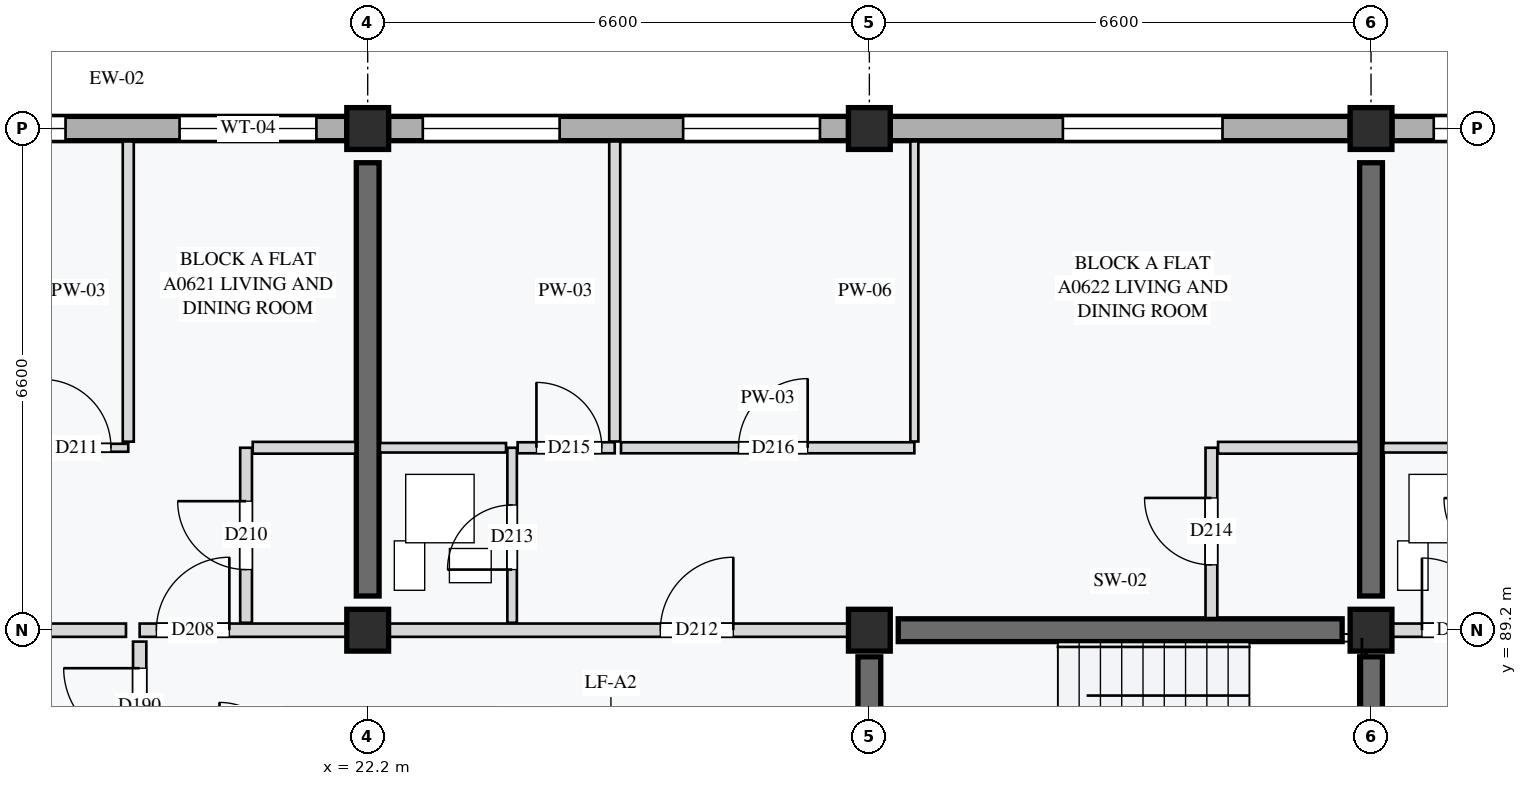
"""IFC4 building model, lengths in metres.
Left out: names, types, materials, properties, quantities, classifications, styles, units other than length and angle.
Written with IfcOpenShell. Run it as: python <this file> out.ifc"""

import sys

from ifc_helpers import new_model, si_unit, direction, frame, frame_2d, origin, origin_2d, place, context, subcontext, project, spatial, rectangle, extrude, element, fill, save


model = new_model("IFC4")
c1 = context("Model", 3, precision=1e-05, world=origin(), true_north=direction((0.0, 1.0)))
c2 = subcontext(c1, "Body", "Model", "MODEL_VIEW")
j1 = project(units=[si_unit("LENGTHUNIT", "METRE"), si_unit("PLANEANGLEUNIT", "RADIAN")], contexts=[c1])
p1 = place(None, origin())
s1 = spatial("IfcSite", under=j1, at=p1, CompositionType="ELEMENT")
p2 = place(p1, origin())
s2 = spatial("IfcBuilding", under=s1, at=p2, CompositionType="ELEMENT")
p3 = place(p2, frame((0.0, 0.0, 21.2)))
s3 = spatial("IfcBuildingStorey", under=s2, at=p3, CompositionType="ELEMENT", Elevation=21.2)
for number, where, z_axis, x_axis in (
    (1, (22.2, 89.2, 0.0), (0.0, 0.0, 1.0), (1.0, 0.0, 0.0)),
    (2, (22.2, 95.8, 0.0), (0.0, 0.0, 1.0), (1.0, 0.0, 0.0)),
    (3, (28.8, 89.2, 0.0), (0.0, 0.0, 1.0), (1.0, 0.0, 0.0)),
    (4, (28.8, 95.8, 0.0), (0.0, 0.0, 1.0), (1.0, 0.0, 0.0)),
    (5, (35.4, 89.2, 0.0), (0.0, 0.0, 1.0), (1.0, 0.0, 0.0)),
    (6, (35.4, 95.8, 0.0), (0.0, 0.0, 1.0), (1.0, 0.0, 0.0)),
):
    element("IfcColumn", number, at=place(p3, frame(where, z_axis=z_axis, x_axis=x_axis)), inside=s3, PredefinedType="COLUMN", context=c2, shape_type="SweptSolid", body=[
        extrude(rectangle(XDim=0.55, YDim=0.55, at=origin_2d()), origin(), (0.0, 0.0, 1.0), 3.2),
    ])
p4 = place(p3, frame((29.18, 89.2, 0.0), z_axis=(0.0, 0.0, 1.0), x_axis=(1.0, 0.0, 0.0)))
e7 = element("IfcWall", 7, at=p4, inside=s3, PredefinedType="SHEAR", context=c2, shape_type="SweptSolid", body=[
    extrude(rectangle(XDim=5.84, YDim=0.3, at=frame_2d((2.92, 0.0))), origin(), (0.0, 0.0, 1.0), 2.96),
])
for number, where, z_axis, x_axis in (
    (8, (28.8, 86.05, 0.0), (0.0, 0.0, 1.0), (0.0, 1.0, 0.0)),
    (9, (35.4, 86.05, 0.0), (0.0, 0.0, 1.0), (0.0, 1.0, 0.0)),
):
    element("IfcWall", number, at=place(p3, frame(where, z_axis=z_axis, x_axis=x_axis)), inside=s3, PredefinedType="SHEAR", context=c2, shape_type="SweptSolid", body=[
        extrude(rectangle(XDim=2.8, YDim=0.3, at=frame_2d((1.4, 0.0))), origin(), (0.0, 0.0, 1.0), 2.96),
    ])
for number, where, z_axis, x_axis in (
    (10, (22.2, 89.65, 0.0), (0.0, 0.0, 1.0), (0.0, 1.0, 0.0)),
    (11, (35.4, 89.65, 0.0), (0.0, 0.0, 1.0), (0.0, 1.0, 0.0)),
):
    element("IfcWall", number, at=place(p3, frame(where, z_axis=z_axis, x_axis=x_axis)), inside=s3, PredefinedType="SHEAR", context=c2, shape_type="SweptSolid", body=[
        extrude(rectangle(XDim=5.7, YDim=0.3, at=frame_2d((2.85, 0.0))), origin(), (0.0, 0.0, 1.0), 2.96),
    ])
p5 = place(p3, frame((15.875, 95.8, 0.0), z_axis=(0.0, 0.0, 1.0), x_axis=(1.0, 0.0, 0.0)))
e12 = element("IfcWall", 12, at=p5, inside=s3, PredefinedType="STANDARD", context=c2, shape_type="SweptSolid", body=[
    extrude(rectangle(XDim=6.05, YDim=0.32, at=frame_2d((3.025, 0.0))), origin(), (0.0, 0.0, 1.0), 2.6),
])
p6 = place(p5, frame((0.55, 0.0, 0.85)))
e13 = element("IfcOpeningElement", 13, at=p6, cuts=e12, PredefinedType="OPENING", context=c2, shape_type="SweptSolid", body=[
    extrude(rectangle(XDim=1.8, YDim=1.35, at=frame_2d((0.9, 0.675))), frame((0.0, 0.17, 0.0), z_axis=(0.0, -1.0, 0.0), x_axis=(1.0, 0.0, 0.0)), (0.0, 0.0, 1.0), 0.34),
])
p7 = place(p5, frame((3.85, 0.0, 0.85)))
e14 = element("IfcOpeningElement", 14, at=p7, cuts=e12, PredefinedType="OPENING", context=c2, shape_type="SweptSolid", body=[
    extrude(rectangle(XDim=1.8, YDim=1.55, at=frame_2d((0.9, 0.775))), frame((0.0, 0.17, 0.0), z_axis=(0.0, -1.0, 0.0), x_axis=(1.0, 0.0, 0.0)), (0.0, 0.0, 1.0), 0.34),
])
p8 = place(p3, frame((22.475, 95.8, 0.0), z_axis=(0.0, 0.0, 1.0), x_axis=(1.0, 0.0, 0.0)))
e15 = element("IfcWall", 15, at=p8, inside=s3, PredefinedType="STANDARD", context=c2, shape_type="SweptSolid", body=[
    extrude(rectangle(XDim=6.05, YDim=0.32, at=frame_2d((3.025, 0.0))), origin(), (0.0, 0.0, 1.0), 2.6),
])
p9 = place(p8, frame((0.45, 0.0, 0.85)))
e16 = element("IfcOpeningElement", 16, at=p9, cuts=e15, PredefinedType="OPENING", context=c2, shape_type="SweptSolid", body=[
    extrude(rectangle(XDim=1.8, YDim=1.35, at=frame_2d((0.9, 0.675))), frame((0.0, 0.17, 0.0), z_axis=(0.0, -1.0, 0.0), x_axis=(1.0, 0.0, 0.0)), (0.0, 0.0, 1.0), 0.34),
])
p10 = place(p8, frame((3.875, 0.0, 0.85)))
e17 = element("IfcOpeningElement", 17, at=p10, cuts=e15, PredefinedType="OPENING", context=c2, shape_type="SweptSolid", body=[
    extrude(rectangle(XDim=1.8, YDim=1.35, at=frame_2d((0.9, 0.675))), frame((0.0, 0.17, 0.0), z_axis=(0.0, -1.0, 0.0), x_axis=(1.0, 0.0, 0.0)), (0.0, 0.0, 1.0), 0.34),
])
p11 = place(p3, frame((29.075, 95.8, 0.0), z_axis=(0.0, 0.0, 1.0), x_axis=(1.0, 0.0, 0.0)))
e18 = element("IfcWall", 18, at=p11, inside=s3, PredefinedType="STANDARD", context=c2, shape_type="SweptSolid", body=[
    extrude(rectangle(XDim=6.05, YDim=0.32, at=frame_2d((3.025, 0.0))), origin(), (0.0, 0.0, 1.0), 2.6),
])
p12 = place(p11, frame((2.271, 0.0, 0.85)))
e19 = element("IfcOpeningElement", 19, at=p12, cuts=e18, PredefinedType="OPENING", context=c2, shape_type="SweptSolid", body=[
    extrude(rectangle(XDim=2.1, YDim=1.55, at=frame_2d((1.05, 0.775))), frame((0.0, 0.17, 0.0), z_axis=(0.0, -1.0, 0.0), x_axis=(1.0, 0.0, 0.0)), (0.0, 0.0, 1.0), 0.34),
])
p13 = place(p3, frame((35.675, 95.8, 0.0), z_axis=(0.0, 0.0, 1.0), x_axis=(1.0, 0.0, 0.0)))
e20 = element("IfcWall", 20, at=p13, inside=s3, PredefinedType="STANDARD", context=c2, shape_type="SweptSolid", body=[
    extrude(rectangle(XDim=6.05, YDim=0.32, at=frame_2d((3.025, 0.0))), origin(), (0.0, 0.0, 1.0), 2.6),
])
p14 = place(p13, frame((0.55, 0.0, 0.85)))
e21 = element("IfcOpeningElement", 21, at=p14, cuts=e20, PredefinedType="OPENING", context=c2, shape_type="SweptSolid", body=[
    extrude(rectangle(XDim=1.8, YDim=1.35, at=frame_2d((0.9, 0.675))), frame((0.0, 0.17, 0.0), z_axis=(0.0, -1.0, 0.0), x_axis=(1.0, 0.0, 0.0)), (0.0, 0.0, 1.0), 0.34),
])
p15 = place(p3, frame((19.2, 86.05, 0.0), z_axis=(0.0, 0.0, 1.0), x_axis=(0.0, 1.0, 0.0)))
e22 = element("IfcWall", 22, at=p15, inside=s3, PredefinedType="PARTITIONING", context=c2, shape_type="SweptSolid", body=[
    extrude(rectangle(XDim=3.0, YDim=0.175, at=frame_2d((1.5, 0.0))), origin(), (0.0, 0.0, 1.0), 2.96),
])
p16 = place(p15, frame((1.65, 0.0, 0.0)))
e23 = element("IfcOpeningElement", 23, at=p16, cuts=e22, PredefinedType="OPENING", context=c2, shape_type="SweptSolid", body=[
    extrude(rectangle(XDim=1.0, YDim=2.1, at=frame_2d((0.5, 1.05))), frame((0.0, 0.097, 0.0), z_axis=(0.0, -1.0, 0.0), x_axis=(1.0, 0.0, 0.0)), (0.0, 0.0, 1.0), 0.195),
])
p17 = place(p3, frame((15.88, 89.2, 0.0), z_axis=(0.0, 0.0, 1.0), x_axis=(1.0, 0.0, 0.0)))
e24 = element("IfcWall", 24, at=p17, inside=s3, PredefinedType="PARTITIONING", context=c2, shape_type="SweptSolid", body=[
    extrude(rectangle(XDim=3.14, YDim=0.175, at=frame_2d((1.57, 0.0))), origin(), (0.0, 0.0, 1.0), 2.55),
])
p18 = place(p3, frame((19.2, 89.2, 0.0), z_axis=(0.0, 0.0, 1.0), x_axis=(1.0, 0.0, 0.0)))
e25 = element("IfcWall", 25, at=p18, inside=s3, PredefinedType="PARTITIONING", context=c2, shape_type="SweptSolid", body=[
    extrude(rectangle(XDim=3.0, YDim=0.175, at=frame_2d((1.5, 0.0))), origin(), (0.0, 0.0, 1.0), 2.55),
])
p19 = place(p18, frame((0.22, 0.0, 0.0)))
e26 = element("IfcOpeningElement", 26, at=p19, cuts=e25, PredefinedType="OPENING", context=c2, shape_type="SweptSolid", body=[
    extrude(rectangle(XDim=0.96, YDim=2.18, at=frame_2d((0.48, 1.09))), frame((0.0, 0.097, 0.0), z_axis=(0.0, -1.0, 0.0), x_axis=(1.0, 0.0, 0.0)), (0.0, 0.0, 1.0), 0.195),
])
p20 = place(p3, frame((20.6, 89.298, 0.0), z_axis=(0.0, 0.0, 1.0), x_axis=(0.0, 1.0, 0.0)))
e27 = element("IfcWall", 27, at=p20, inside=s3, PredefinedType="PARTITIONING", context=c2, shape_type="SweptSolid", body=[
    extrude(rectangle(XDim=2.302, YDim=0.155, at=frame_2d((1.151, 0.0))), origin(), (0.0, 0.0, 1.0), 2.96),
])
p21 = place(p20, frame((0.7, 0.0, 0.0)))
e28 = element("IfcOpeningElement", 28, at=p21, cuts=e27, PredefinedType="OPENING", context=c2, shape_type="SweptSolid", body=[
    extrude(rectangle(XDim=0.9, YDim=2.1, at=frame_2d((0.45, 1.05))), frame((0.0, 0.087, 0.0), z_axis=(0.0, -1.0, 0.0), x_axis=(1.0, 0.0, 0.0)), (0.0, 0.0, 1.0), 0.175),
])
p22 = place(p3, frame((20.688, 91.6, 0.0), z_axis=(0.0, 0.0, 1.0), x_axis=(1.0, 0.0, 0.0)))
e29 = element("IfcWall", 29, at=p22, inside=s3, PredefinedType="PARTITIONING", context=c2, shape_type="SweptSolid", body=[
    extrude(rectangle(XDim=1.353, YDim=0.155, at=frame_2d((0.676, 0.0))), origin(), (0.0, 0.0, 1.0), 2.96),
])
p23 = place(p3, frame((17.573, 91.6, 0.0), z_axis=(0.0, 0.0, 1.0), x_axis=(1.0, 0.0, 0.0)))
e30 = element("IfcWall", 30, at=p23, inside=s3, PredefinedType="PARTITIONING", context=c2, shape_type="SweptSolid", body=[
    extrude(rectangle(XDim=1.478, YDim=0.105, at=frame_2d((0.739, 0.0))), origin(), (0.0, 0.0, 1.0), 2.96),
])
p24 = place(p23, frame((0.35, 0.0, 0.0)))
e31 = element("IfcOpeningElement", 31, at=p24, cuts=e30, PredefinedType="OPENING", context=c2, shape_type="SweptSolid", body=[
    extrude(rectangle(XDim=0.9, YDim=2.16, at=frame_2d((0.45, 1.08))), frame((0.0, 0.062, 0.0), z_axis=(0.0, -1.0, 0.0), x_axis=(1.0, 0.0, 0.0)), (0.0, 0.0, 1.0), 0.125),
])
p25 = place(p3, frame((19.05, 91.68, 0.0), z_axis=(0.0, 0.0, 1.0), x_axis=(0.0, 1.0, 0.0)))
e32 = element("IfcWall", 32, at=p25, inside=s3, PredefinedType="PARTITIONING", context=c2, shape_type="SweptSolid", body=[
    extrude(rectangle(XDim=3.95, YDim=0.145, at=frame_2d((1.975, 0.0))), origin(), (0.0, 0.0, 1.0), 2.96),
])
p26 = place(p3, frame((22.2, 89.2, 0.0), z_axis=(0.0, 0.0, 1.0), x_axis=(1.0, 0.0, 0.0)))
e33 = element("IfcWall", 33, at=p26, inside=s3, PredefinedType="PARTITIONING", context=c2, shape_type="SweptSolid", body=[
    extrude(rectangle(XDim=6.6, YDim=0.175, at=frame_2d((3.3, 0.0))), origin(), (0.0, 0.0, 1.0), 2.55),
])
p27 = place(p26, frame((3.85, 0.0, 0.0)))
e34 = element("IfcOpeningElement", 34, at=p27, cuts=e33, PredefinedType="OPENING", context=c2, shape_type="SweptSolid", body=[
    extrude(rectangle(XDim=0.96, YDim=2.18, at=frame_2d((0.48, 1.09))), frame((0.0, 0.097, 0.0), z_axis=(0.0, -1.0, 0.0), x_axis=(1.0, 0.0, 0.0)), (0.0, 0.0, 1.0), 0.195),
])
p28 = place(p3, frame((24.1, 89.298, 0.0), z_axis=(0.0, 0.0, 1.0), x_axis=(0.0, 1.0, 0.0)))
e35 = element("IfcWall", 35, at=p28, inside=s3, PredefinedType="PARTITIONING", context=c2, shape_type="SweptSolid", body=[
    extrude(rectangle(XDim=2.302, YDim=0.125, at=frame_2d((1.151, 0.0))), origin(), (0.0, 0.0, 1.0), 2.96),
])
p29 = place(p28, frame((0.7, 0.0, 0.0)))
e36 = element("IfcOpeningElement", 36, at=p29, cuts=e35, PredefinedType="OPENING", context=c2, shape_type="SweptSolid", body=[
    extrude(rectangle(XDim=0.85, YDim=2.04, at=frame_2d((0.425, 1.02))), frame((0.0, 0.073, 0.0), z_axis=(0.0, -1.0, 0.0), x_axis=(1.0, 0.0, 0.0)), (0.0, 0.0, 1.0), 0.145),
])
p30 = place(p3, frame((22.36, 91.6, 0.0), z_axis=(0.0, 0.0, 1.0), x_axis=(1.0, 0.0, 0.0)))
e37 = element("IfcWall", 37, at=p30, inside=s3, PredefinedType="PARTITIONING", context=c2, shape_type="SweptSolid", body=[
    extrude(rectangle(XDim=1.66, YDim=0.125, at=frame_2d((0.83, 0.0))), origin(), (0.0, 0.0, 1.0), 2.96),
])
p31 = place(p3, frame((33.3, 89.36, 0.0), z_axis=(0.0, 0.0, 1.0), x_axis=(0.0, 1.0, 0.0)))
e38 = element("IfcWall", 38, at=p31, inside=s3, PredefinedType="PARTITIONING", context=c2, shape_type="SweptSolid", body=[
    extrude(rectangle(XDim=2.24, YDim=0.155, at=frame_2d((1.12, 0.0))), origin(), (0.0, 0.0, 1.0), 2.96),
])
p32 = place(p31, frame((0.7, 0.0, 0.0)))
e39 = element("IfcOpeningElement", 39, at=p32, cuts=e38, PredefinedType="OPENING", context=c2, shape_type="SweptSolid", body=[
    extrude(rectangle(XDim=0.88, YDim=2.16, at=frame_2d((0.44, 1.08))), frame((0.0, 0.087, 0.0), z_axis=(0.0, -1.0, 0.0), x_axis=(1.0, 0.0, 0.0)), (0.0, 0.0, 1.0), 0.175),
])
p33 = place(p3, frame((33.387, 91.6, 0.0), z_axis=(0.0, 0.0, 1.0), x_axis=(1.0, 0.0, 0.0)))
e40 = element("IfcWall", 40, at=p33, inside=s3, PredefinedType="PARTITIONING", context=c2, shape_type="SweptSolid", body=[
    extrude(rectangle(XDim=1.853, YDim=0.155, at=frame_2d((0.926, 0.0))), origin(), (0.0, 0.0, 1.0), 2.96),
])
p34 = place(p3, frame((24.173, 91.6, 0.0), z_axis=(0.0, 0.0, 1.0), x_axis=(1.0, 0.0, 0.0)))
e41 = element("IfcWall", 41, at=p34, inside=s3, PredefinedType="PARTITIONING", context=c2, shape_type="SweptSolid", body=[
    extrude(rectangle(XDim=1.277, YDim=0.145, at=frame_2d((0.639, 0.0))), origin(), (0.0, 0.0, 1.0), 2.96),
])
p35 = place(p34, frame((0.248, 0.0, 0.0)))
e42 = element("IfcOpeningElement", 42, at=p35, cuts=e41, PredefinedType="OPENING", context=c2, shape_type="SweptSolid", body=[
    extrude(rectangle(XDim=0.86, YDim=2.12, at=frame_2d((0.43, 1.06))), frame((0.0, 0.083, 0.0), z_axis=(0.0, -1.0, 0.0), x_axis=(1.0, 0.0, 0.0)), (0.0, 0.0, 1.0), 0.165),
])
p36 = place(p3, frame((25.45, 91.683, 0.0), z_axis=(0.0, 0.0, 1.0), x_axis=(0.0, 1.0, 0.0)))
e43 = element("IfcWall", 43, at=p36, inside=s3, PredefinedType="PARTITIONING", context=c2, shape_type="SweptSolid", body=[
    extrude(rectangle(XDim=3.947, YDim=0.145, at=frame_2d((1.974, 0.0))), origin(), (0.0, 0.0, 1.0), 2.96),
])
p37 = place(p3, frame((25.532, 91.6, 0.0), z_axis=(0.0, 0.0, 1.0), x_axis=(1.0, 0.0, 0.0)))
e44 = element("IfcWall", 44, at=p37, inside=s3, PredefinedType="PARTITIONING", context=c2, shape_type="SweptSolid", body=[
    extrude(rectangle(XDim=3.86, YDim=0.145, at=frame_2d((1.93, 0.0))), origin(), (0.0, 0.0, 1.0), 2.96),
])
p38 = place(p37, frame((1.546, 0.0, 0.0)))
e45 = element("IfcOpeningElement", 45, at=p38, cuts=e44, PredefinedType="OPENING", context=c2, shape_type="SweptSolid", body=[
    extrude(rectangle(XDim=0.91, YDim=2.14, at=frame_2d((0.455, 1.07))), frame((0.0, 0.083, 0.0), z_axis=(0.0, -1.0, 0.0), x_axis=(1.0, 0.0, 0.0)), (0.0, 0.0, 1.0), 0.165),
])
p39 = place(p3, frame((29.392, 91.683, 0.0), z_axis=(0.0, 0.0, 1.0), x_axis=(0.0, 1.0, 0.0)))
e46 = element("IfcWall", 46, at=p39, inside=s3, PredefinedType="PARTITIONING", context=c2, shape_type="SweptSolid", body=[
    extrude(rectangle(XDim=3.947, YDim=0.105, at=frame_2d((1.974, 0.0))), origin(), (0.0, 0.0, 1.0), 2.96),
])
p40 = place(p3, frame((35.4, 89.2, 0.0), z_axis=(0.0, 0.0, 1.0), x_axis=(1.0, 0.0, 0.0)))
e47 = element("IfcWall", 47, at=p40, inside=s3, PredefinedType="PARTITIONING", context=c2, shape_type="SweptSolid", body=[
    extrude(rectangle(XDim=13.2, YDim=0.175, at=frame_2d((6.6, 0.0))), origin(), (0.0, 0.0, 1.0), 2.55),
])
p41 = place(p40, frame((0.67, 0.0, 0.0)))
e48 = element("IfcOpeningElement", 48, at=p41, cuts=e47, PredefinedType="OPENING", context=c2, shape_type="SweptSolid", body=[
    extrude(rectangle(XDim=0.95, YDim=2.1, at=frame_2d((0.475, 1.05))), frame((0.0, 0.097, 0.0), z_axis=(0.0, -1.0, 0.0), x_axis=(1.0, 0.0, 0.0)), (0.0, 0.0, 1.0), 0.195),
])
p42 = place(p3, frame((35.56, 91.6, 0.0), z_axis=(0.0, 0.0, 1.0), x_axis=(1.0, 0.0, 0.0)))
e49 = element("IfcWall", 49, at=p42, inside=s3, PredefinedType="PARTITIONING", context=c2, shape_type="SweptSolid", body=[
    extrude(rectangle(XDim=1.66, YDim=0.125, at=frame_2d((0.83, 0.0))), origin(), (0.0, 0.0, 1.0), 2.96),
])
p43 = place(p6, origin())
e50 = element("IfcWindow", 50, at=p43, inside=s3, PartitioningType="SINGLE_PANEL", PredefinedType="WINDOW", context=c2, shape_type="SweptSolid", body=[
    extrude(rectangle(XDim=1.8, YDim=1.35, at=frame_2d((0.9, 0.675))), frame((0.0, 0.03, 0.0), z_axis=(0.0, -1.0, 0.0), x_axis=(1.0, 0.0, 0.0)), (0.0, 0.0, 1.0), 0.06),
])
fill(e13, e50)
p44 = place(p7, origin())
e51 = element("IfcWindow", 51, at=p44, inside=s3, PartitioningType="SINGLE_PANEL", PredefinedType="WINDOW", context=c2, shape_type="SweptSolid", body=[
    extrude(rectangle(XDim=1.8, YDim=1.55, at=frame_2d((0.9, 0.775))), frame((0.0, 0.03, 0.0), z_axis=(0.0, -1.0, 0.0), x_axis=(1.0, 0.0, 0.0)), (0.0, 0.0, 1.0), 0.06),
])
fill(e14, e51)
p45 = place(p9, origin())
e52 = element("IfcWindow", 52, at=p45, inside=s3, PartitioningType="SINGLE_PANEL", PredefinedType="WINDOW", context=c2, shape_type="SweptSolid", body=[
    extrude(rectangle(XDim=1.8, YDim=1.35, at=frame_2d((0.9, 0.675))), frame((0.0, 0.03, 0.0), z_axis=(0.0, -1.0, 0.0), x_axis=(1.0, 0.0, 0.0)), (0.0, 0.0, 1.0), 0.06),
])
fill(e16, e52)
p46 = place(p10, origin())
e53 = element("IfcWindow", 53, at=p46, inside=s3, PartitioningType="SINGLE_PANEL", PredefinedType="WINDOW", context=c2, shape_type="SweptSolid", body=[
    extrude(rectangle(XDim=1.8, YDim=1.35, at=frame_2d((0.9, 0.675))), frame((0.0, 0.03, 0.0), z_axis=(0.0, -1.0, 0.0), x_axis=(1.0, 0.0, 0.0)), (0.0, 0.0, 1.0), 0.06),
])
fill(e17, e53)
p47 = place(p12, origin())
e54 = element("IfcWindow", 54, at=p47, inside=s3, PartitioningType="SINGLE_PANEL", PredefinedType="WINDOW", context=c2, shape_type="SweptSolid", body=[
    extrude(rectangle(XDim=2.1, YDim=1.55, at=frame_2d((1.05, 0.775))), frame((0.0, 0.03, 0.0), z_axis=(0.0, -1.0, 0.0), x_axis=(1.0, 0.0, 0.0)), (0.0, 0.0, 1.0), 0.06),
])
fill(e19, e54)
p48 = place(p14, origin())
e55 = element("IfcWindow", 55, at=p48, inside=s3, PartitioningType="SINGLE_PANEL", PredefinedType="WINDOW", context=c2, shape_type="SweptSolid", body=[
    extrude(rectangle(XDim=1.8, YDim=1.35, at=frame_2d((0.9, 0.675))), frame((0.0, 0.03, 0.0), z_axis=(0.0, -1.0, 0.0), x_axis=(1.0, 0.0, 0.0)), (0.0, 0.0, 1.0), 0.06),
])
fill(e21, e55)
p49 = place(p16, origin())
e56 = element("IfcDoor", 56, at=p49, inside=s3, OperationType="SINGLE_SWING_RIGHT", PredefinedType="DOOR", context=c2, shape_type="SweptSolid", body=[
    extrude(rectangle(XDim=1.0, YDim=2.1, at=frame_2d((0.5, 1.05))), frame((0.0, 0.025, 0.0), z_axis=(0.0, -1.0, 0.0), x_axis=(1.0, 0.0, 0.0)), (0.0, 0.0, 1.0), 0.05),
])
fill(e23, e56)
p50 = place(p19, origin())
e57 = element("IfcDoor", 57, at=p50, inside=s3, OperationType="SINGLE_SWING_RIGHT", PredefinedType="DOOR", context=c2, shape_type="SweptSolid", body=[
    extrude(rectangle(XDim=0.96, YDim=2.18, at=frame_2d((0.48, 1.09))), frame((0.0, 0.025, 0.0), z_axis=(0.0, -1.0, 0.0), x_axis=(1.0, 0.0, 0.0)), (0.0, 0.0, 1.0), 0.05),
])
fill(e26, e57)
p51 = place(p21, origin())
e58 = element("IfcDoor", 58, at=p51, inside=s3, OperationType="SINGLE_SWING_RIGHT", PredefinedType="DOOR", context=c2, shape_type="SweptSolid", body=[
    extrude(rectangle(XDim=0.9, YDim=2.1, at=frame_2d((0.45, 1.05))), frame((0.0, 0.025, 0.0), z_axis=(0.0, -1.0, 0.0), x_axis=(1.0, 0.0, 0.0)), (0.0, 0.0, 1.0), 0.05),
])
fill(e28, e58)
p52 = place(p24, origin())
e59 = element("IfcDoor", 59, at=p52, inside=s3, OperationType="SINGLE_SWING_LEFT", PredefinedType="DOOR", context=c2, shape_type="SweptSolid", body=[
    extrude(rectangle(XDim=0.9, YDim=2.16, at=frame_2d((0.45, 1.08))), frame((0.0, 0.025, 0.0), z_axis=(0.0, -1.0, 0.0), x_axis=(1.0, 0.0, 0.0)), (0.0, 0.0, 1.0), 0.05),
])
fill(e31, e59)
p53 = place(p27, origin())
e60 = element("IfcDoor", 60, at=p53, inside=s3, OperationType="SINGLE_SWING_RIGHT", PredefinedType="DOOR", context=c2, shape_type="SweptSolid", body=[
    extrude(rectangle(XDim=0.96, YDim=2.18, at=frame_2d((0.48, 1.09))), frame((0.0, 0.025, 0.0), z_axis=(0.0, -1.0, 0.0), x_axis=(1.0, 0.0, 0.0)), (0.0, 0.0, 1.0), 0.05),
])
fill(e34, e60)
p54 = place(p29, origin())
e61 = element("IfcDoor", 61, at=p54, inside=s3, OperationType="SINGLE_SWING_LEFT", PredefinedType="DOOR", context=c2, shape_type="SweptSolid", body=[
    extrude(rectangle(XDim=0.85, YDim=2.04, at=frame_2d((0.425, 1.02))), frame((0.0, 0.025, 0.0), z_axis=(0.0, -1.0, 0.0), x_axis=(1.0, 0.0, 0.0)), (0.0, 0.0, 1.0), 0.05),
])
fill(e36, e61)
p55 = place(p32, origin())
e62 = element("IfcDoor", 62, at=p55, inside=s3, OperationType="SINGLE_SWING_RIGHT", PredefinedType="DOOR", context=c2, shape_type="SweptSolid", body=[
    extrude(rectangle(XDim=0.88, YDim=2.16, at=frame_2d((0.44, 1.08))), frame((0.0, 0.025, 0.0), z_axis=(0.0, -1.0, 0.0), x_axis=(1.0, 0.0, 0.0)), (0.0, 0.0, 1.0), 0.05),
])
fill(e39, e62)
p56 = place(p35, origin())
e63 = element("IfcDoor", 63, at=p56, inside=s3, OperationType="SINGLE_SWING_LEFT", PredefinedType="DOOR", context=c2, shape_type="SweptSolid", body=[
    extrude(rectangle(XDim=0.86, YDim=2.12, at=frame_2d((0.43, 1.06))), frame((0.0, 0.025, 0.0), z_axis=(0.0, -1.0, 0.0), x_axis=(1.0, 0.0, 0.0)), (0.0, 0.0, 1.0), 0.05),
])
fill(e42, e63)
p57 = place(p38, origin())
e64 = element("IfcDoor", 64, at=p57, inside=s3, OperationType="SINGLE_SWING_RIGHT", PredefinedType="DOOR", context=c2, shape_type="SweptSolid", body=[
    extrude(rectangle(XDim=0.91, YDim=2.14, at=frame_2d((0.455, 1.07))), frame((0.0, 0.025, 0.0), z_axis=(0.0, -1.0, 0.0), x_axis=(1.0, 0.0, 0.0)), (0.0, 0.0, 1.0), 0.05),
])
fill(e45, e64)
p58 = place(p41, origin())
e65 = element("IfcDoor", 65, at=p58, inside=s3, OperationType="SINGLE_SWING_LEFT", PredefinedType="DOOR", context=c2, shape_type="SweptSolid", body=[
    extrude(rectangle(XDim=0.95, YDim=2.1, at=frame_2d((0.475, 1.05))), frame((0.0, 0.025, 0.0), z_axis=(0.0, -1.0, 0.0), x_axis=(1.0, 0.0, 0.0)), (0.0, 0.0, 1.0), 0.05),
])
fill(e48, e65)
save(model, sys.argv[1])
